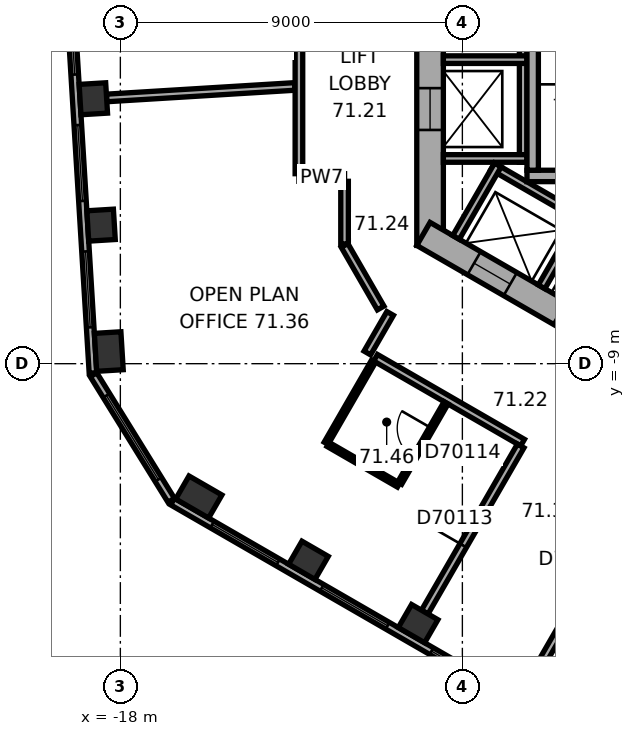
"""IFC4 building model, lengths in metres.
Left out: names, types, materials, properties, quantities, classifications, styles, units other than length and angle.
Written with IfcOpenShell. Run it as: python <this file> out.ifc"""

import sys

from ifc_helpers import new_model, si_unit, direction, frame, frame_2d, origin, origin_2d, place, context, subcontext, project, spatial, rectangle, extrude, element, fill, save


model = new_model("IFC4")
c1 = context("Model", 3, precision=1e-05, world=origin(), true_north=direction((0.0, 1.0)))
c2 = subcontext(c1, "Body", "Model", "MODEL_VIEW")
j1 = project(units=[si_unit("LENGTHUNIT", "METRE"), si_unit("PLANEANGLEUNIT", "RADIAN")], contexts=[c1])
p1 = place(None, origin())
s1 = spatial("IfcSite", under=j1, at=p1, CompositionType="ELEMENT")
p2 = place(p1, origin())
s2 = spatial("IfcBuilding", under=s1, at=p2, CompositionType="ELEMENT")
p3 = place(p2, frame((0.0, 0.0, 289.4)))
s3 = spatial("IfcBuildingStorey", under=s2, at=p3, CompositionType="ELEMENT", Elevation=289.4)
for number, where, z_axis, x_axis in (
    (1, (-18.711, -2.03, 0.0), (0.0, 0.0, 1.0), (0.061, -0.998, 0.0)),
    (2, (-18.508, -5.355, 0.0), (0.0, 0.0, 1.0), (0.061, -0.998, 0.0)),
):
    element("IfcColumn", number, at=place(p3, frame(where, z_axis=z_axis, x_axis=x_axis)), inside=s3, PredefinedType="COLUMN", context=c2, shape_type="SweptSolid", body=[
        extrude(rectangle(XDim=0.8, YDim=0.7, at=origin_2d()), origin(), (0.0, 0.0, 1.0), 3.7),
    ])
for number, where, z_axis, x_axis in (
    (3, (-18.304, -8.68, 0.0), (0.0, 0.0, 1.0), (0.061, -0.998, 0.0)),
    (4, (-15.936, -12.508, 0.0), (0.0, 0.0, 1.0), (0.866, -0.5, 0.0)),
):
    element("IfcColumn", number, at=place(p3, frame(where, z_axis=z_axis, x_axis=x_axis)), inside=s3, PredefinedType="COLUMN", context=c2, shape_type="SweptSolid", body=[
        extrude(rectangle(XDim=1.0, YDim=0.7, at=origin_2d()), origin(), (0.0, 0.0, 1.0), 3.7),
    ])
for number, where, z_axis, x_axis in (
    (5, (-13.05, -14.174, 0.0), (0.0, 0.0, 1.0), (0.866, -0.5, 0.0)),
    (6, (-10.165, -15.84, 0.0), (0.0, 0.0, 1.0), (0.866, -0.5, 0.0)),
):
    element("IfcColumn", number, at=place(p3, frame(where, z_axis=z_axis, x_axis=x_axis)), inside=s3, PredefinedType="COLUMN", context=c2, shape_type="SweptSolid", body=[
        extrude(rectangle(XDim=0.8, YDim=0.7, at=origin_2d()), origin(), (0.0, 0.0, 1.0), 3.7),
    ])
p4 = place(p3, frame((-9.85, 5.889, 0.0), z_axis=(0.0, 0.0, 1.0), x_axis=(0.0, -1.0, 0.0)))
e7 = element("IfcWall", 7, at=p4, inside=s3, PredefinedType="SHEAR", context=c2, shape_type="SweptSolid", body=[
    extrude(rectangle(XDim=11.778, YDim=0.7, at=frame_2d((5.889, 0.0))), origin(), (0.0, 0.0, 1.0), 3.7),
])
p5 = place(p4, frame((5.039, 0.0, 0.0)))
e8 = element("IfcOpeningElement", 8, at=p5, cuts=e7, PredefinedType="OPENING", context=c2, shape_type="SweptSolid", body=[
    extrude(rectangle(XDim=1.1, YDim=2.1, at=frame_2d((0.55, 1.05))), frame((0.0, 0.36, 0.0), z_axis=(0.0, -1.0, 0.0), x_axis=(1.0, 0.0, 0.0)), (0.0, 0.0, 1.0), 0.72),
])
p6 = place(p4, frame((7.639, 0.0, 0.0)))
e9 = element("IfcOpeningElement", 9, at=p6, cuts=e7, PredefinedType="OPENING", context=c2, shape_type="SweptSolid", body=[
    extrude(rectangle(XDim=1.1, YDim=2.1, at=frame_2d((0.55, 1.05))), frame((0.0, 0.36, 0.0), z_axis=(0.0, -1.0, 0.0), x_axis=(1.0, 0.0, 0.0)), (0.0, 0.0, 1.0), 0.72),
])
p7 = place(p3, frame((-10.025, -5.586, 0.0), z_axis=(0.0, 0.0, 1.0), x_axis=(0.866026453023, -0.499998182661, 0.0)))
e10 = element("IfcWall", 10, at=p7, inside=s3, PredefinedType="SHEAR", context=c2, shape_type="SweptSolid", body=[
    extrude(rectangle(XDim=11.778, YDim=0.7, at=frame_2d((5.889, 0.0))), origin(), (0.0, 0.0, 1.0), 3.7),
])
p8 = place(p7, frame((6.089, 0.0, 0.0)))
e11 = element("IfcOpeningElement", 11, at=p8, cuts=e10, PredefinedType="OPENING", context=c2, shape_type="SweptSolid", body=[
    extrude(rectangle(XDim=1.5, YDim=2.1, at=frame_2d((0.75, 1.05))), frame((0.0, 0.36, 0.0), z_axis=(0.0, -1.0, 0.0), x_axis=(1.0, 0.0, 0.0)), (0.0, 0.0, 1.0), 0.72),
])
p9 = place(p7, frame((1.539, 0.0, 0.0)))
e12 = element("IfcOpeningElement", 12, at=p9, cuts=e10, PredefinedType="OPENING", context=c2, shape_type="SweptSolid", body=[
    extrude(rectangle(XDim=1.1, YDim=2.1, at=frame_2d((0.55, 1.05))), frame((0.0, 0.36, 0.0), z_axis=(0.0, -1.0, 0.0), x_axis=(1.0, 0.0, 0.0)), (0.0, 0.0, 1.0), 0.72),
])
p10 = place(p7, frame((4.139, 0.0, 0.0)))
e13 = element("IfcOpeningElement", 13, at=p10, cuts=e10, PredefinedType="OPENING", context=c2, shape_type="SweptSolid", body=[
    extrude(rectangle(XDim=1.1, YDim=2.1, at=frame_2d((0.55, 1.05))), frame((0.0, 0.36, 0.0), z_axis=(0.0, -1.0, 0.0), x_axis=(1.0, 0.0, 0.0)), (0.0, 0.0, 1.0), 0.72),
])
p11 = place(p3, frame((-19.803, 8.454, 0.0), z_axis=(0.0, 0.0, 1.0), x_axis=(0.061036717565, -0.998135521414, 0.0)))
e14 = element("IfcWall", 14, at=p11, inside=s3, PredefinedType="STANDARD", context=c2, shape_type="SweptSolid", body=[
    extrude(rectangle(XDim=17.731, YDim=0.2, at=frame_2d((8.866, 0.0))), origin(), (0.0, 0.0, 1.0), 3.7),
])
p12 = place(p11, frame((1.202, 0.0, 0.9)))
e15 = element("IfcOpeningElement", 15, at=p12, cuts=e14, PredefinedType="OPENING", context=c2, shape_type="SweptSolid", body=[
    extrude(rectangle(XDim=2.0, YDim=2.0, at=frame_2d((1.0, 1.0))), frame((0.0, 0.11, 0.0), z_axis=(0.0, -1.0, 0.0), x_axis=(1.0, 0.0, 0.0)), (0.0, 0.0, 1.0), 0.22),
])
p13 = place(p11, frame((4.533, 0.0, 0.9)))
e16 = element("IfcOpeningElement", 16, at=p13, cuts=e14, PredefinedType="OPENING", context=c2, shape_type="SweptSolid", body=[
    extrude(rectangle(XDim=2.0, YDim=2.0, at=frame_2d((1.0, 1.0))), frame((0.0, 0.11, 0.0), z_axis=(0.0, -1.0, 0.0), x_axis=(1.0, 0.0, 0.0)), (0.0, 0.0, 1.0), 0.22),
])
p14 = place(p11, frame((7.865, 0.0, 0.9)))
e17 = element("IfcOpeningElement", 17, at=p14, cuts=e14, PredefinedType="OPENING", context=c2, shape_type="SweptSolid", body=[
    extrude(rectangle(XDim=2.0, YDim=2.0, at=frame_2d((1.0, 1.0))), frame((0.0, 0.11, 0.0), z_axis=(0.0, -1.0, 0.0), x_axis=(1.0, 0.0, 0.0)), (0.0, 0.0, 1.0), 0.22),
])
p15 = place(p11, frame((11.197, 0.0, 0.9)))
e18 = element("IfcOpeningElement", 18, at=p15, cuts=e14, PredefinedType="OPENING", context=c2, shape_type="SweptSolid", body=[
    extrude(rectangle(XDim=2.0, YDim=2.0, at=frame_2d((1.0, 1.0))), frame((0.0, 0.11, 0.0), z_axis=(0.0, -1.0, 0.0), x_axis=(1.0, 0.0, 0.0)), (0.0, 0.0, 1.0), 0.22),
])
p16 = place(p11, frame((14.528, 0.0, 0.9)))
e19 = element("IfcOpeningElement", 19, at=p16, cuts=e14, PredefinedType="OPENING", context=c2, shape_type="SweptSolid", body=[
    extrude(rectangle(XDim=2.0, YDim=2.0, at=frame_2d((1.0, 1.0))), frame((0.0, 0.11, 0.0), z_axis=(0.0, -1.0, 0.0), x_axis=(1.0, 0.0, 0.0)), (0.0, 0.0, 1.0), 0.22),
])
p17 = place(p3, frame((-18.706, -9.291, 0.0), z_axis=(0.0, 0.0, 1.0), x_axis=(0.526209683648, -0.850354848775, 0.0)))
e20 = element("IfcWall", 20, at=p17, inside=s3, PredefinedType="STANDARD", context=c2, shape_type="SweptSolid", body=[
    extrude(rectangle(XDim=3.886, YDim=0.2, at=frame_2d((1.943, 0.0))), origin(), (0.0, 0.0, 1.0), 3.7),
])
p18 = place(p17, frame((0.643, 0.0, 0.9)))
e21 = element("IfcOpeningElement", 21, at=p18, cuts=e20, PredefinedType="OPENING", context=c2, shape_type="SweptSolid", body=[
    extrude(rectangle(XDim=2.6, YDim=2.0, at=frame_2d((1.3, 1.0))), frame((0.0, 0.11, 0.0), z_axis=(0.0, -1.0, 0.0), x_axis=(1.0, 0.0, 0.0)), (0.0, 0.0, 1.0), 0.22),
])
p19 = place(p3, frame((-16.626, -12.629, 0.0), z_axis=(0.0, 0.0, 1.0), x_axis=(0.866026460444, -0.499998169808, 0.0)))
e22 = element("IfcWall", 22, at=p19, inside=s3, PredefinedType="STANDARD", context=c2, shape_type="SweptSolid", body=[
    extrude(rectangle(XDim=17.731, YDim=0.2, at=frame_2d((8.866, 0.0))), origin(), (0.0, 0.0, 1.0), 3.7),
])
p20 = place(p19, frame((1.203, 0.0, 0.9)))
e23 = element("IfcOpeningElement", 23, at=p20, cuts=e22, PredefinedType="OPENING", context=c2, shape_type="SweptSolid", body=[
    extrude(rectangle(XDim=2.0, YDim=2.0, at=frame_2d((1.0, 1.0))), frame((0.0, 0.11, 0.0), z_axis=(0.0, -1.0, 0.0), x_axis=(1.0, 0.0, 0.0)), (0.0, 0.0, 1.0), 0.22),
])
p21 = place(p19, frame((4.535, 0.0, 0.9)))
e24 = element("IfcOpeningElement", 24, at=p21, cuts=e22, PredefinedType="OPENING", context=c2, shape_type="SweptSolid", body=[
    extrude(rectangle(XDim=2.0, YDim=2.0, at=frame_2d((1.0, 1.0))), frame((0.0, 0.11, 0.0), z_axis=(0.0, -1.0, 0.0), x_axis=(1.0, 0.0, 0.0)), (0.0, 0.0, 1.0), 0.22),
])
p22 = place(p19, frame((7.867, 0.0, 0.9)))
e25 = element("IfcOpeningElement", 25, at=p22, cuts=e22, PredefinedType="OPENING", context=c2, shape_type="SweptSolid", body=[
    extrude(rectangle(XDim=2.0, YDim=2.0, at=frame_2d((1.0, 1.0))), frame((0.0, 0.11, 0.0), z_axis=(0.0, -1.0, 0.0), x_axis=(1.0, 0.0, 0.0)), (0.0, 0.0, 1.0), 0.22),
])
p23 = place(p19, frame((11.198, 0.0, 0.9)))
e26 = element("IfcOpeningElement", 26, at=p23, cuts=e22, PredefinedType="OPENING", context=c2, shape_type="SweptSolid", body=[
    extrude(rectangle(XDim=2.0, YDim=2.0, at=frame_2d((1.0, 1.0))), frame((0.0, 0.11, 0.0), z_axis=(0.0, -1.0, 0.0), x_axis=(1.0, 0.0, 0.0)), (0.0, 0.0, 1.0), 0.22),
])
p24 = place(p19, frame((14.53, 0.0, 0.9)))
e27 = element("IfcOpeningElement", 27, at=p24, cuts=e22, PredefinedType="OPENING", context=c2, shape_type="SweptSolid", body=[
    extrude(rectangle(XDim=2.0, YDim=2.0, at=frame_2d((1.0, 1.0))), frame((0.0, 0.11, 0.0), z_axis=(0.0, -1.0, 0.0), x_axis=(1.0, 0.0, 0.0)), (0.0, 0.0, 1.0), 0.22),
])
p25 = place(p3, frame((-7.4, 4.3, 0.0), z_axis=(0.0, 0.0, 1.0), x_axis=(0.0, -1.0, 0.0)))
e28 = element("IfcWall", 28, at=p25, inside=s3, PredefinedType="PARTITIONING", context=c2, shape_type="SweptSolid", body=[
    extrude(rectangle(XDim=8.0, YDim=0.2, at=frame_2d((4.0, 0.0))), origin(), (0.0, 0.0, 1.0), 3.42),
])
for number, where, z_axis, x_axis in (
    (29, (-7.3, -1.0, 0.0), (0.0, 0.0, 1.0), (-1.0, 0.0, 0.0)),
    (30, (-7.3, -3.6, 0.0), (0.0, 0.0, 1.0), (-1.0, 0.0, 0.0)),
):
    element("IfcWall", number, at=place(p3, frame(where, z_axis=z_axis, x_axis=x_axis)), inside=s3, PredefinedType="PARTITIONING", context=c2, shape_type="SweptSolid", body=[
        extrude(rectangle(XDim=2.2, YDim=0.2, at=frame_2d((1.1, 0.0))), origin(), (0.0, 0.0, 1.0), 3.42),
    ])
p26 = place(p3, frame((-8.203, -3.809, 0.0), z_axis=(0.0, 0.0, 1.0), x_axis=(0.866028230842, -0.499995103361, 0.0)))
e31 = element("IfcWall", 31, at=p26, inside=s3, PredefinedType="PARTITIONING", context=c2, shape_type="SweptSolid", body=[
    extrude(rectangle(XDim=5.4, YDim=0.2, at=frame_2d((2.7, 0.0))), origin(), (0.0, 0.0, 1.0), 3.42),
])
for number, where, z_axis, x_axis in (
    (32, (-8.067, -3.772, 0.0), (0.0, 0.0, 1.0), (-0.5, -0.866, 0.0)),
    (33, (-5.815, -5.072, 0.0), (0.0, 0.0, 1.0), (-0.5, -0.866, 0.0)),
):
    element("IfcWall", number, at=place(p3, frame(where, z_axis=z_axis, x_axis=x_axis)), inside=s3, PredefinedType="PARTITIONING", context=c2, shape_type="SweptSolid", body=[
        extrude(rectangle(XDim=2.2, YDim=0.2, at=frame_2d((1.1, 0.0))), origin(), (0.0, 0.0, 1.0), 3.42),
    ])
p27 = place(p3, frame((-2.6, -4.06, 0.0), z_axis=(0.0, 0.0, 1.0), x_axis=(-1.0, 0.0, 0.0)))
e34 = element("IfcWall", 34, at=p27, inside=s3, PredefinedType="SHEAR", context=c2, shape_type="SweptSolid", body=[
    extrude(rectangle(XDim=4.7, YDim=0.3, at=frame_2d((2.35, 0.0))), origin(), (0.0, 0.0, 1.0), 3.42),
])
p28 = place(p3, frame((-7.15, 3.15, 0.0), z_axis=(0.0, 0.0, 1.0), x_axis=(0.0, -1.0, 0.0)))
e35 = element("IfcWall", 35, at=p28, inside=s3, PredefinedType="SHEAR", context=c2, shape_type="SweptSolid", body=[
    extrude(rectangle(XDim=7.06, YDim=0.3, at=frame_2d((3.53, 0.0))), origin(), (0.0, 0.0, 1.0), 3.42),
])
p29 = place(p3, frame((-18.362, -2.008, 0.0), z_axis=(0.0, 0.0, 1.0), x_axis=(0.998135748374, 0.061033005966, 0.0)))
e36 = element("IfcWall", 36, at=p29, inside=s3, PredefinedType="PARTITIONING", context=c2, shape_type="SweptSolid", body=[
    extrude(rectangle(XDim=4.96, YDim=0.2, at=frame_2d((2.48, 0.0))), origin(), (0.0, 0.0, 1.0), 3.42),
])
p30 = place(p3, frame((-13.301, -4.101, 0.0), z_axis=(0.0, 0.0, 1.0), x_axis=(1.0, 0.0, 0.0)))
e37 = element("IfcWall", 37, at=p30, inside=s3, PredefinedType="PARTITIONING", context=c2, shape_type="SweptSolid", body=[
    extrude(rectangle(XDim=1.201, YDim=0.2, at=frame_2d((0.601, 0.0))), origin(), (0.0, 0.0, 1.0), 3.42),
])
p31 = place(p3, frame((-13.301, 1.851, 0.0), z_axis=(0.0, 0.0, 1.0), x_axis=(0.0, -1.0, 0.0)))
e38 = element("IfcWall", 38, at=p31, inside=s3, PredefinedType="PARTITIONING", context=c2, shape_type="SweptSolid", body=[
    extrude(rectangle(XDim=5.852, YDim=0.2, at=frame_2d((2.926, 0.0))), origin(), (0.0, 0.0, 1.0), 3.42),
])
p32 = place(p3, frame((-12.585, -11.095, 0.0), z_axis=(0.0, 0.0, 1.0), x_axis=(0.500004234368, 0.866022959057, 0.0)))
e39 = element("IfcWall", 39, at=p32, inside=s3, PredefinedType="PARTITIONING", context=c2, shape_type="SweptSolid", body=[
    extrude(rectangle(XDim=2.5, YDim=0.12, at=frame_2d((1.25, 0.0))), origin(), (0.0, 0.0, 1.0), 3.42),
])
p33 = place(p3, frame((-12.1, -5.889, 0.0), z_axis=(0.0, 0.0, 1.0), x_axis=(0.500063520245, -0.865988727248, 0.0)))
e40 = element("IfcWall", 40, at=p33, inside=s3, PredefinedType="PARTITIONING", context=c2, shape_type="SweptSolid", body=[
    extrude(rectangle(XDim=1.9, YDim=0.2, at=frame_2d((0.95, 0.0))), origin(), (0.0, 0.0, 1.0), 3.42),
])
p34 = place(p3, frame((-12.1, -4.201, 0.0), z_axis=(0.0, 0.0, 1.0), x_axis=(0.0, -1.0, 0.0)))
e41 = element("IfcWall", 41, at=p34, inside=s3, PredefinedType="PARTITIONING", context=c2, shape_type="SweptSolid", body=[
    extrude(rectangle(XDim=1.648, YDim=0.2, at=frame_2d((0.824, 0.0))), origin(), (0.0, 0.0, 1.0), 3.42),
])
p35 = place(p3, frame((-11.285, -8.844, 0.0), z_axis=(0.0, 0.0, 1.0), x_axis=(0.866021785011, -0.500006267848, 0.0)))
e42 = element("IfcWall", 42, at=p35, inside=s3, PredefinedType="PARTITIONING", context=c2, shape_type="SweptSolid", body=[
    extrude(rectangle(XDim=4.468, YDim=0.2, at=frame_2d((2.234, 0.0))), origin(), (0.0, 0.0, 1.0), 3.42),
])
p36 = place(p3, frame((-10.901, -7.678, 0.0), z_axis=(0.0, 0.0, 1.0), x_axis=(-0.500074377092, -0.865982457891, 0.0)))
e43 = element("IfcWall", 43, at=p36, inside=s3, PredefinedType="PARTITIONING", context=c2, shape_type="SweptSolid", body=[
    extrude(rectangle(XDim=1.201, YDim=0.2, at=frame_2d((0.601, 0.0))), origin(), (0.0, 0.0, 1.0), 3.42),
])
p37 = place(p3, frame((-10.679, -12.195, 0.0), z_axis=(0.0, 0.0, 1.0), x_axis=(-0.866037418504, 0.499979189318, 0.0)))
e44 = element("IfcWall", 44, at=p37, inside=s3, PredefinedType="PARTITIONING", context=c2, shape_type="SweptSolid", body=[
    extrude(rectangle(XDim=2.14, YDim=0.12, at=frame_2d((1.07, 0.0))), origin(), (0.0, 0.0, 1.0), 3.42),
])
p38 = place(p3, frame((-9.99, -15.537, 0.0), z_axis=(0.0, 0.0, 1.0), x_axis=(0.499966611936, 0.866044679534, 0.0)))
e45 = element("IfcWall", 45, at=p38, inside=s3, PredefinedType="PARTITIONING", context=c2, shape_type="SweptSolid", body=[
    extrude(rectangle(XDim=5.049, YDim=0.2, at=frame_2d((2.524, 0.0))), origin(), (0.0, 0.0, 1.0), 2.87),
])
p39 = place(p38, frame((2.024, 0.0, 0.0)))
e46 = element("IfcOpeningElement", 46, at=p39, cuts=e45, PredefinedType="OPENING", context=c2, shape_type="SweptSolid", body=[
    extrude(rectangle(XDim=1.0, YDim=2.1, at=frame_2d((0.5, 1.05))), frame((0.0, 0.11, 0.0), z_axis=(0.0, -1.0, 0.0), x_axis=(1.0, 0.0, 0.0)), (0.0, 0.0, 1.0), 0.22),
])
p40 = place(p3, frame((-9.429, -10.03, 0.0), z_axis=(0.0, 0.0, 1.0), x_axis=(-0.500034220881, -0.866005645448, 0.0)))
e47 = element("IfcWall", 47, at=p40, inside=s3, PredefinedType="PARTITIONING", context=c2, shape_type="SweptSolid", body=[
    extrude(rectangle(XDim=2.44, YDim=0.12, at=frame_2d((1.22, 0.0))), origin(), (0.0, 0.0, 1.0), 3.42),
])
p41 = place(p40, frame((0.77, 0.0, 0.0)))
e48 = element("IfcOpeningElement", 48, at=p41, cuts=e47, PredefinedType="OPENING", context=c2, shape_type="SweptSolid", body=[
    extrude(rectangle(XDim=0.9, YDim=2.1, at=frame_2d((0.45, 1.05))), frame((0.0, 0.07, 0.0), z_axis=(0.0, -1.0, 0.0), x_axis=(1.0, 0.0, 0.0)), (0.0, 0.0, 1.0), 0.14),
])
p42 = place(p3, frame((-7.105, -17.202, 0.0), z_axis=(0.0, 0.0, 1.0), x_axis=(0.499988692146, 0.866031932279, 0.0)))
e49 = element("IfcWall", 49, at=p42, inside=s3, PredefinedType="PARTITIONING", context=c2, shape_type="SweptSolid", body=[
    extrude(rectangle(XDim=6.35, YDim=0.2, at=frame_2d((3.175, 0.0))), origin(), (0.0, 0.0, 1.0), 3.42),
])
p43 = place(p42, frame((2.675, 0.0, 0.0)))
e50 = element("IfcOpeningElement", 50, at=p43, cuts=e49, PredefinedType="OPENING", context=c2, shape_type="SweptSolid", body=[
    extrude(rectangle(XDim=1.0, YDim=2.1, at=frame_2d((0.5, 1.05))), frame((0.0, 0.11, 0.0), z_axis=(0.0, -1.0, 0.0), x_axis=(1.0, 0.0, 0.0)), (0.0, 0.0, 1.0), 0.22),
])
p44 = place(p14, origin())
e51 = element("IfcWindow", 51, at=p44, inside=s3, PartitioningType="SINGLE_PANEL", PredefinedType="WINDOW", context=c2, shape_type="SweptSolid", body=[
    extrude(rectangle(XDim=2.0, YDim=2.0, at=frame_2d((1.0, 1.0))), frame((0.0, 0.03, 0.0), z_axis=(0.0, -1.0, 0.0), x_axis=(1.0, 0.0, 0.0)), (0.0, 0.0, 1.0), 0.06),
])
fill(e17, e51)
p45 = place(p15, origin())
e52 = element("IfcWindow", 52, at=p45, inside=s3, PartitioningType="SINGLE_PANEL", PredefinedType="WINDOW", context=c2, shape_type="SweptSolid", body=[
    extrude(rectangle(XDim=2.0, YDim=2.0, at=frame_2d((1.0, 1.0))), frame((0.0, 0.03, 0.0), z_axis=(0.0, -1.0, 0.0), x_axis=(1.0, 0.0, 0.0)), (0.0, 0.0, 1.0), 0.06),
])
fill(e18, e52)
p46 = place(p16, origin())
e53 = element("IfcWindow", 53, at=p46, inside=s3, PartitioningType="SINGLE_PANEL", PredefinedType="WINDOW", context=c2, shape_type="SweptSolid", body=[
    extrude(rectangle(XDim=2.0, YDim=2.0, at=frame_2d((1.0, 1.0))), frame((0.0, 0.03, 0.0), z_axis=(0.0, -1.0, 0.0), x_axis=(1.0, 0.0, 0.0)), (0.0, 0.0, 1.0), 0.06),
])
fill(e19, e53)
p47 = place(p18, origin())
e54 = element("IfcWindow", 54, at=p47, inside=s3, PartitioningType="SINGLE_PANEL", PredefinedType="WINDOW", context=c2, shape_type="SweptSolid", body=[
    extrude(rectangle(XDim=2.6, YDim=2.0, at=frame_2d((1.3, 1.0))), frame((0.0, 0.03, 0.0), z_axis=(0.0, -1.0, 0.0), x_axis=(1.0, 0.0, 0.0)), (0.0, 0.0, 1.0), 0.06),
])
fill(e21, e54)
p48 = place(p20, origin())
e55 = element("IfcWindow", 55, at=p48, inside=s3, PartitioningType="SINGLE_PANEL", PredefinedType="WINDOW", context=c2, shape_type="SweptSolid", body=[
    extrude(rectangle(XDim=2.0, YDim=2.0, at=frame_2d((1.0, 1.0))), frame((0.0, 0.03, 0.0), z_axis=(0.0, -1.0, 0.0), x_axis=(1.0, 0.0, 0.0)), (0.0, 0.0, 1.0), 0.06),
])
fill(e23, e55)
p49 = place(p21, origin())
e56 = element("IfcWindow", 56, at=p49, inside=s3, PartitioningType="SINGLE_PANEL", PredefinedType="WINDOW", context=c2, shape_type="SweptSolid", body=[
    extrude(rectangle(XDim=2.0, YDim=2.0, at=frame_2d((1.0, 1.0))), frame((0.0, 0.03, 0.0), z_axis=(0.0, -1.0, 0.0), x_axis=(1.0, 0.0, 0.0)), (0.0, 0.0, 1.0), 0.06),
])
fill(e24, e56)
p50 = place(p22, origin())
e57 = element("IfcWindow", 57, at=p50, inside=s3, PartitioningType="SINGLE_PANEL", PredefinedType="WINDOW", context=c2, shape_type="SweptSolid", body=[
    extrude(rectangle(XDim=2.0, YDim=2.0, at=frame_2d((1.0, 1.0))), frame((0.0, 0.03, 0.0), z_axis=(0.0, -1.0, 0.0), x_axis=(1.0, 0.0, 0.0)), (0.0, 0.0, 1.0), 0.06),
])
fill(e25, e57)
p51 = place(p6, origin())
e58 = element("IfcDoor", 58, at=p51, inside=s3, OperationType="DOUBLE_DOOR_SLIDING", PredefinedType="DOOR", context=c2, shape_type="SweptSolid", body=[
    extrude(rectangle(XDim=1.1, YDim=2.1, at=frame_2d((0.55, 1.05))), frame((0.0, 0.025, 0.0), z_axis=(0.0, -1.0, 0.0), x_axis=(1.0, 0.0, 0.0)), (0.0, 0.0, 1.0), 0.05),
])
fill(e9, e58)
p52 = place(p9, origin())
e59 = element("IfcDoor", 59, at=p52, inside=s3, OperationType="DOUBLE_DOOR_SLIDING", PredefinedType="DOOR", context=c2, shape_type="SweptSolid", body=[
    extrude(rectangle(XDim=1.1, YDim=2.1, at=frame_2d((0.55, 1.05))), frame((0.0, 0.025, 0.0), z_axis=(0.0, -1.0, 0.0), x_axis=(1.0, 0.0, 0.0)), (0.0, 0.0, 1.0), 0.05),
])
fill(e12, e59)
p53 = place(p39, origin())
e60 = element("IfcDoor", 60, at=p53, inside=s3, OperationType="SINGLE_SWING_LEFT", PredefinedType="DOOR", context=c2, shape_type="SweptSolid", body=[
    extrude(rectangle(XDim=1.0, YDim=2.1, at=frame_2d((0.5, 1.05))), frame((0.0, 0.025, 0.0), z_axis=(0.0, -1.0, 0.0), x_axis=(1.0, 0.0, 0.0)), (0.0, 0.0, 1.0), 0.05),
])
fill(e46, e60)
p54 = place(p41, origin())
e61 = element("IfcDoor", 61, at=p54, inside=s3, OperationType="SINGLE_SWING_LEFT", PredefinedType="DOOR", context=c2, shape_type="SweptSolid", body=[
    extrude(rectangle(XDim=0.9, YDim=2.1, at=frame_2d((0.45, 1.05))), frame((0.0, 0.025, 0.0), z_axis=(0.0, -1.0, 0.0), x_axis=(1.0, 0.0, 0.0)), (0.0, 0.0, 1.0), 0.05),
])
fill(e48, e61)
save(model, sys.argv[1])
